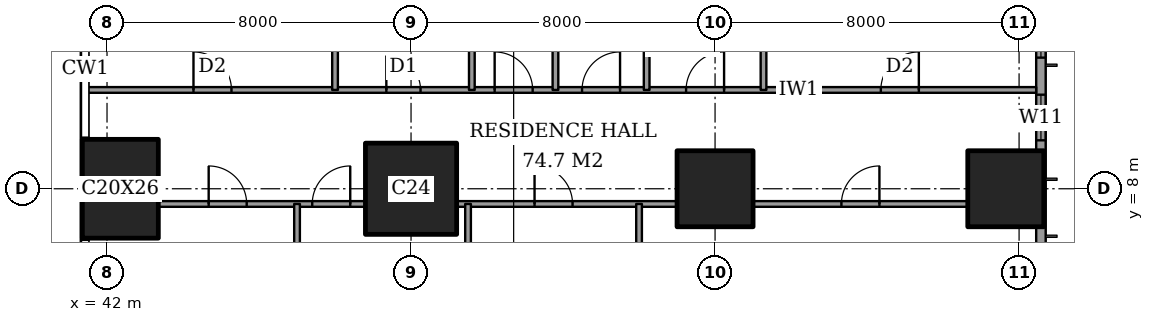
"""IFC4 building model, lengths in metres.
Left out: names, types, materials, properties, quantities, classifications, styles, units other than length and angle.
Written with IfcOpenShell. Run it as: python <this file> out.ifc"""

import sys

from ifc_helpers import new_model, si_unit, direction, frame, frame_2d, origin, origin_2d, place, context, subcontext, project, spatial, rectangle, extrude, element, fill, save


model = new_model("IFC4")
c1 = context("Model", 3, precision=1e-05, world=origin(), true_north=direction((0.0, 1.0)))
c2 = subcontext(c1, "Body", "Model", "MODEL_VIEW")
j1 = project(units=[si_unit("LENGTHUNIT", "METRE"), si_unit("PLANEANGLEUNIT", "RADIAN")], contexts=[c1])
p1 = place(None, origin())
s1 = spatial("IfcSite", under=j1, at=p1, CompositionType="ELEMENT")
p2 = place(p1, origin())
s2 = spatial("IfcBuilding", under=s1, at=p2, CompositionType="ELEMENT")
p3 = place(p2, frame((0.0, 0.0, 99.8)))
s3 = spatial("IfcBuildingStorey", under=s2, at=p3, CompositionType="ELEMENT", Elevation=99.8)
p4 = place(p3, frame((42.35, 8.0, 0.0), z_axis=(0.0, 0.0, 1.0), x_axis=(1.0, 0.0, 0.0)))
e1 = element("IfcColumn", 1, at=p4, inside=s3, PredefinedType="COLUMN", context=c2, shape_type="SweptSolid", body=[
    extrude(rectangle(XDim=2.0, YDim=2.6, at=origin_2d()), origin(), (0.0, 0.0, 1.0), 3.6),
])
p5 = place(p3, frame((50.0, 8.0, 0.0), z_axis=(0.0, 0.0, 1.0), x_axis=(1.0, 0.0, 0.0)))
e2 = element("IfcColumn", 2, at=p5, inside=s3, PredefinedType="COLUMN", context=c2, shape_type="SweptSolid", body=[
    extrude(rectangle(XDim=2.4, YDim=2.4, at=origin_2d()), origin(), (0.0, 0.0, 1.0), 3.6),
])
for number, where, z_axis, x_axis in (
    (3, (58.0, 8.0, 0.0), (0.0, 0.0, 1.0), (1.0, 0.0, 0.0)),
    (4, (65.65, 8.0, 0.0), (0.0, 0.0, 1.0), (1.0, 0.0, 0.0)),
):
    element("IfcColumn", number, at=place(p3, frame(where, z_axis=z_axis, x_axis=x_axis)), inside=s3, PredefinedType="COLUMN", context=c2, shape_type="SweptSolid", body=[
        extrude(rectangle(XDim=2.0, YDim=2.0, at=origin_2d()), origin(), (0.0, 0.0, 1.0), 3.6),
    ])
p6 = place(p3, frame((66.575, 3.175, 0.0), z_axis=(0.0, 0.0, 1.0), x_axis=(0.0, 1.0, 0.0)))
e5 = element("IfcWall", 5, at=p6, inside=s3, PredefinedType="SOLIDWALL", context=c2, shape_type="SweptSolid", body=[
    extrude(rectangle(XDim=41.65, YDim=0.25, at=frame_2d((20.825, 0.0))), origin(), (0.0, 0.0, 1.0), 3.6),
])
p7 = place(p6, frame((0.775, 0.0, 0.4)))
e6 = element("IfcOpeningElement", 6, at=p7, cuts=e5, PredefinedType="OPENING", context=c2, shape_type="SweptSolid", body=[
    extrude(rectangle(XDim=2.4, YDim=2.2, at=frame_2d((1.2, 1.1))), frame((0.0, 0.135, 0.0), z_axis=(0.0, -1.0, 0.0), x_axis=(1.0, 0.0, 0.0)), (0.0, 0.0, 1.0), 0.27),
])
p8 = place(p6, frame((6.1, 0.0, 0.4)))
e7 = element("IfcOpeningElement", 7, at=p8, cuts=e5, PredefinedType="OPENING", context=c2, shape_type="SweptSolid", body=[
    extrude(rectangle(XDim=1.2, YDim=2.2, at=frame_2d((0.6, 1.1))), frame((0.0, 0.135, 0.0), z_axis=(0.0, -1.0, 0.0), x_axis=(1.0, 0.0, 0.0)), (0.0, 0.0, 1.0), 0.27),
])
p9 = place(p6, frame((8.275, 0.0, 0.4)))
e8 = element("IfcOpeningElement", 8, at=p9, cuts=e5, PredefinedType="OPENING", context=c2, shape_type="SweptSolid", body=[
    extrude(rectangle(XDim=2.4, YDim=2.2, at=frame_2d((1.2, 1.1))), frame((0.0, 0.135, 0.0), z_axis=(0.0, -1.0, 0.0), x_axis=(1.0, 0.0, 0.0)), (0.0, 0.0, 1.0), 0.27),
])
p10 = place(p6, frame((15.775, 0.0, 0.4)))
e9 = element("IfcOpeningElement", 9, at=p10, cuts=e5, PredefinedType="OPENING", context=c2, shape_type="SweptSolid", body=[
    extrude(rectangle(XDim=2.4, YDim=2.2, at=frame_2d((1.2, 1.1))), frame((0.0, 0.135, 0.0), z_axis=(0.0, -1.0, 0.0), x_axis=(1.0, 0.0, 0.0)), (0.0, 0.0, 1.0), 0.27),
])
p11 = place(p6, frame((23.475, 0.0, 0.4)))
e10 = element("IfcOpeningElement", 10, at=p11, cuts=e5, PredefinedType="OPENING", context=c2, shape_type="SweptSolid", body=[
    extrude(rectangle(XDim=2.4, YDim=2.2, at=frame_2d((1.2, 1.1))), frame((0.0, 0.135, 0.0), z_axis=(0.0, -1.0, 0.0), x_axis=(1.0, 0.0, 0.0)), (0.0, 0.0, 1.0), 0.27),
])
p12 = place(p6, frame((30.975, 0.0, 0.4)))
e11 = element("IfcOpeningElement", 11, at=p12, cuts=e5, PredefinedType="OPENING", context=c2, shape_type="SweptSolid", body=[
    extrude(rectangle(XDim=2.4, YDim=2.2, at=frame_2d((1.2, 1.1))), frame((0.0, 0.135, 0.0), z_axis=(0.0, -1.0, 0.0), x_axis=(1.0, 0.0, 0.0)), (0.0, 0.0, 1.0), 0.27),
])
p13 = place(p6, frame((34.5, 0.0, 0.4)))
e12 = element("IfcOpeningElement", 12, at=p13, cuts=e5, PredefinedType="OPENING", context=c2, shape_type="SweptSolid", body=[
    extrude(rectangle(XDim=1.2, YDim=2.2, at=frame_2d((0.6, 1.1))), frame((0.0, 0.135, 0.0), z_axis=(0.0, -1.0, 0.0), x_axis=(1.0, 0.0, 0.0)), (0.0, 0.0, 1.0), 0.27),
])
p14 = place(p6, frame((38.475, 0.0, 0.4)))
e13 = element("IfcOpeningElement", 13, at=p14, cuts=e5, PredefinedType="OPENING", context=c2, shape_type="SweptSolid", body=[
    extrude(rectangle(XDim=2.4, YDim=2.2, at=frame_2d((1.2, 1.1))), frame((0.0, 0.135, 0.0), z_axis=(0.0, -1.0, 0.0), x_axis=(1.0, 0.0, 0.0)), (0.0, 0.0, 1.0), 0.27),
])
p15 = place(p3, frame((43.35, 7.6, 0.0), z_axis=(0.0, 0.0, 1.0), x_axis=(1.0, 0.0, 0.0)))
e14 = element("IfcWall", 14, at=p15, inside=s3, PredefinedType="PARTITIONING", context=c2, shape_type="SweptSolid", body=[
    extrude(rectangle(XDim=5.45, YDim=0.15, at=frame_2d((2.725, 0.0))), origin(), (0.0, 0.0, 1.0), 3.35),
])
p16 = place(p15, frame((4.05, 0.0, 0.0)))
e15 = element("IfcOpeningElement", 15, at=p16, cuts=e14, PredefinedType="OPENING", context=c2, shape_type="SweptSolid", body=[
    extrude(rectangle(XDim=1.0, YDim=2.1, at=frame_2d((0.5, 1.05))), frame((0.0, 0.085, 0.0), z_axis=(0.0, -1.0, 0.0), x_axis=(1.0, 0.0, 0.0)), (0.0, 0.0, 1.0), 0.17),
])
p17 = place(p15, frame((1.325, 0.0, 0.0)))
e16 = element("IfcOpeningElement", 16, at=p17, cuts=e14, PredefinedType="OPENING", context=c2, shape_type="SweptSolid", body=[
    extrude(rectangle(XDim=1.0, YDim=2.1, at=frame_2d((0.5, 1.05))), frame((0.0, 0.085, 0.0), z_axis=(0.0, -1.0, 0.0), x_axis=(1.0, 0.0, 0.0)), (0.0, 0.0, 1.0), 0.17),
])
p18 = place(p3, frame((51.2, 7.6, 0.0), z_axis=(0.0, 0.0, 1.0), x_axis=(1.0, 0.0, 0.0)))
e17 = element("IfcWall", 17, at=p18, inside=s3, PredefinedType="PARTITIONING", context=c2, shape_type="SweptSolid", body=[
    extrude(rectangle(XDim=5.8, YDim=0.15, at=frame_2d((2.9, 0.0))), origin(), (0.0, 0.0, 1.0), 3.35),
])
p19 = place(p18, frame((2.05, 0.0, 0.0)))
e18 = element("IfcOpeningElement", 18, at=p19, cuts=e17, PredefinedType="OPENING", context=c2, shape_type="SweptSolid", body=[
    extrude(rectangle(XDim=1.0, YDim=2.1, at=frame_2d((0.5, 1.05))), frame((0.0, 0.085, 0.0), z_axis=(0.0, -1.0, 0.0), x_axis=(1.0, 0.0, 0.0)), (0.0, 0.0, 1.0), 0.17),
])
p20 = place(p3, frame((59.0, 7.6, 0.0), z_axis=(0.0, 0.0, 1.0), x_axis=(1.0, 0.0, 0.0)))
e19 = element("IfcWall", 19, at=p20, inside=s3, PredefinedType="PARTITIONING", context=c2, shape_type="SweptSolid", body=[
    extrude(rectangle(XDim=5.65, YDim=0.15, at=frame_2d((2.825, 0.0))), origin(), (0.0, 0.0, 1.0), 3.35),
])
p21 = place(p20, frame((2.325, 0.0, 0.0)))
e20 = element("IfcOpeningElement", 20, at=p21, cuts=e19, PredefinedType="OPENING", context=c2, shape_type="SweptSolid", body=[
    extrude(rectangle(XDim=1.0, YDim=2.1, at=frame_2d((0.5, 1.05))), frame((0.0, 0.085, 0.0), z_axis=(0.0, -1.0, 0.0), x_axis=(1.0, 0.0, 0.0)), (0.0, 0.0, 1.0), 0.17),
])
p22 = place(p3, frame((41.439, 10.6, 0.0), z_axis=(0.0, 0.0, 1.0), x_axis=(1.0, 0.0, 0.0)))
e21 = element("IfcWall", 21, at=p22, inside=s3, PredefinedType="PARTITIONING", context=c2, shape_type="SweptSolid", body=[
    extrude(rectangle(XDim=25.011, YDim=0.15, at=frame_2d((12.505, 0.0))), origin(), (0.0, 0.0, 1.0), 3.35),
])
p23 = place(p22, frame((10.761, 0.0, 0.0)))
e22 = element("IfcOpeningElement", 22, at=p23, cuts=e21, PredefinedType="OPENING", context=c2, shape_type="SweptSolid", body=[
    extrude(rectangle(XDim=1.0, YDim=2.1, at=frame_2d((0.5, 1.05))), frame((0.0, 0.085, 0.0), z_axis=(0.0, -1.0, 0.0), x_axis=(1.0, 0.0, 0.0)), (0.0, 0.0, 1.0), 0.17),
])
p24 = place(p22, frame((20.924, 0.0, 0.0)))
e23 = element("IfcOpeningElement", 23, at=p24, cuts=e21, PredefinedType="OPENING", context=c2, shape_type="SweptSolid", body=[
    extrude(rectangle(XDim=1.0, YDim=2.1, at=frame_2d((0.5, 1.05))), frame((0.0, 0.085, 0.0), z_axis=(0.0, -1.0, 0.0), x_axis=(1.0, 0.0, 0.0)), (0.0, 0.0, 1.0), 0.17),
])
p25 = place(p22, frame((15.799, 0.0, 0.0)))
e24 = element("IfcOpeningElement", 24, at=p25, cuts=e21, PredefinedType="OPENING", context=c2, shape_type="SweptSolid", body=[
    extrude(rectangle(XDim=1.0, YDim=2.1, at=frame_2d((0.5, 1.05))), frame((0.0, 0.085, 0.0), z_axis=(0.0, -1.0, 0.0), x_axis=(1.0, 0.0, 0.0)), (0.0, 0.0, 1.0), 0.17),
])
p26 = place(p22, frame((13.061, 0.0, 0.0)))
e25 = element("IfcOpeningElement", 25, at=p26, cuts=e21, PredefinedType="OPENING", context=c2, shape_type="SweptSolid", body=[
    extrude(rectangle(XDim=1.0, YDim=2.1, at=frame_2d((0.5, 1.05))), frame((0.0, 0.085, 0.0), z_axis=(0.0, -1.0, 0.0), x_axis=(1.0, 0.0, 0.0)), (0.0, 0.0, 1.0), 0.17),
])
p27 = place(p22, frame((7.911, 0.0, 0.0)))
e26 = element("IfcOpeningElement", 26, at=p27, cuts=e21, PredefinedType="OPENING", context=c2, shape_type="SweptSolid", body=[
    extrude(rectangle(XDim=0.9, YDim=2.1, at=frame_2d((0.45, 1.05))), frame((0.0, 0.085, 0.0), z_axis=(0.0, -1.0, 0.0), x_axis=(1.0, 0.0, 0.0)), (0.0, 0.0, 1.0), 0.17),
])
p28 = place(p22, frame((2.836, 0.0, 0.0)))
e27 = element("IfcOpeningElement", 27, at=p28, cuts=e21, PredefinedType="OPENING", context=c2, shape_type="SweptSolid", body=[
    extrude(rectangle(XDim=1.0, YDim=2.1, at=frame_2d((0.5, 1.05))), frame((0.0, 0.085, 0.0), z_axis=(0.0, -1.0, 0.0), x_axis=(1.0, 0.0, 0.0)), (0.0, 0.0, 1.0), 0.17),
])
p29 = place(p3, frame((47.0, -0.45, 0.0), z_axis=(0.0, 0.0, 1.0), x_axis=(0.0, 1.0, 0.0)))
e28 = element("IfcWall", 28, at=p29, inside=s3, PredefinedType="PARTITIONING", context=c2, shape_type="SweptSolid", body=[
    extrude(rectangle(XDim=8.05, YDim=0.15, at=frame_2d((4.025, 0.0))), origin(), (0.0, 0.0, 1.0), 3.35),
])
p30 = place(p3, frame((48.0, 10.6, 0.0), z_axis=(0.0, 0.0, 1.0), x_axis=(0.0, 1.0, 0.0)))
e29 = element("IfcWall", 29, at=p30, inside=s3, PredefinedType="PARTITIONING", context=c2, shape_type="SweptSolid", body=[
    extrude(rectangle(XDim=13.4, YDim=0.15, at=frame_2d((6.7, 0.0))), origin(), (0.0, 0.0, 1.0), 3.35),
])
p31 = place(p30, frame((10.8, 0.0, 0.0)))
e30 = element("IfcOpeningElement", 30, at=p31, cuts=e29, PredefinedType="OPENING", context=c2, shape_type="SweptSolid", body=[
    extrude(rectangle(XDim=1.2, YDim=2.4, at=frame_2d((0.6, 1.2))), frame((0.0, 0.085, 0.0), z_axis=(0.0, -1.0, 0.0), x_axis=(1.0, 0.0, 0.0)), (0.0, 0.0, 1.0), 0.17),
])
p32 = place(p30, frame((6.7, 0.0, 0.0)))
e31 = element("IfcOpeningElement", 31, at=p32, cuts=e29, PredefinedType="OPENING", context=c2, shape_type="SweptSolid", body=[
    extrude(rectangle(XDim=0.9, YDim=2.1, at=frame_2d((0.45, 1.05))), frame((0.0, 0.085, 0.0), z_axis=(0.0, -1.0, 0.0), x_axis=(1.0, 0.0, 0.0)), (0.0, 0.0, 1.0), 0.17),
])
p33 = place(p3, frame((51.5, -0.45, 0.0), z_axis=(0.0, 0.0, 1.0), x_axis=(0.0, 1.0, 0.0)))
e32 = element("IfcWall", 32, at=p33, inside=s3, PredefinedType="PARTITIONING", context=c2, shape_type="SweptSolid", body=[
    extrude(rectangle(XDim=8.05, YDim=0.15, at=frame_2d((4.025, 0.0))), origin(), (0.0, 0.0, 1.0), 3.35),
])
for number, where, z_axis, x_axis in (
    (33, (51.6, 10.6, 0.0), (0.0, 0.0, 1.0), (0.0, 1.0, 0.0)),
    (34, (53.8, 10.6, 0.0), (0.0, 0.0, 1.0), (0.0, 1.0, 0.0)),
):
    element("IfcWall", number, at=place(p3, frame(where, z_axis=z_axis, x_axis=x_axis)), inside=s3, PredefinedType="PARTITIONING", context=c2, shape_type="SweptSolid", body=[
        extrude(rectangle(XDim=4.0, YDim=0.15, at=frame_2d((2.0, 0.0))), origin(), (0.0, 0.0, 1.0), 3.35),
    ])
p34 = place(p3, frame((56.0, -0.45, 0.0), z_axis=(0.0, 0.0, 1.0), x_axis=(0.0, 1.0, 0.0)))
e35 = element("IfcWall", 35, at=p34, inside=s3, PredefinedType="PARTITIONING", context=c2, shape_type="SweptSolid", body=[
    extrude(rectangle(XDim=8.05, YDim=0.15, at=frame_2d((4.025, 0.0))), origin(), (0.0, 0.0, 1.0), 3.35),
])
p35 = place(p3, frame((56.2, 10.6, 0.0), z_axis=(0.0, 0.0, 1.0), x_axis=(0.0, 1.0, 0.0)))
e36 = element("IfcWall", 36, at=p35, inside=s3, PredefinedType="PARTITIONING", context=c2, shape_type="SweptSolid", body=[
    extrude(rectangle(XDim=11.0, YDim=0.15, at=frame_2d((5.5, 0.0))), origin(), (0.0, 0.0, 1.0), 3.35),
])
p36 = place(p35, frame((7.0, 0.0, 0.0)))
e37 = element("IfcOpeningElement", 37, at=p36, cuts=e36, PredefinedType="OPENING", context=c2, shape_type="SweptSolid", body=[
    extrude(rectangle(XDim=1.0, YDim=2.1, at=frame_2d((0.5, 1.05))), frame((0.0, 0.085, 0.0), z_axis=(0.0, -1.0, 0.0), x_axis=(1.0, 0.0, 0.0)), (0.0, 0.0, 1.0), 0.17),
])
p37 = place(p3, frame((59.275, 10.6, 0.0), z_axis=(0.0, 0.0, 1.0), x_axis=(0.0, 1.0, 0.0)))
e38 = element("IfcWall", 38, at=p37, inside=s3, PredefinedType="PARTITIONING", context=c2, shape_type="SweptSolid", body=[
    extrude(rectangle(XDim=4.2, YDim=0.15, at=frame_2d((2.1, 0.0))), origin(), (0.0, 0.0, 1.0), 3.35),
])
p38 = place(p8, origin())
e39 = element("IfcWindow", 39, at=p38, inside=s3, PartitioningType="SINGLE_PANEL", PredefinedType="WINDOW", context=c2, shape_type="SweptSolid", body=[
    extrude(rectangle(XDim=1.2, YDim=2.2, at=frame_2d((0.6, 1.1))), frame((0.0, 0.03, 0.0), z_axis=(0.0, -1.0, 0.0), x_axis=(1.0, 0.0, 0.0)), (0.0, 0.0, 1.0), 0.06),
])
fill(e7, e39)
p39 = place(p9, origin())
e40 = element("IfcWindow", 40, at=p39, inside=s3, PartitioningType="SINGLE_PANEL", PredefinedType="WINDOW", context=c2, shape_type="SweptSolid", body=[
    extrude(rectangle(XDim=2.4, YDim=2.2, at=frame_2d((1.2, 1.1))), frame((0.0, 0.03, 0.0), z_axis=(0.0, -1.0, 0.0), x_axis=(1.0, 0.0, 0.0)), (0.0, 0.0, 1.0), 0.06),
])
fill(e8, e40)
p40 = place(p21, origin())
e41 = element("IfcDoor", 41, at=p40, inside=s3, OperationType="SINGLE_SWING_LEFT", PredefinedType="DOOR", context=c2, shape_type="SweptSolid", body=[
    extrude(rectangle(XDim=1.0, YDim=2.1, at=frame_2d((0.5, 1.05))), frame((0.0, 0.025, 0.0), z_axis=(0.0, -1.0, 0.0), x_axis=(1.0, 0.0, 0.0)), (0.0, 0.0, 1.0), 0.05),
])
fill(e20, e41)
p41 = place(p19, origin())
e42 = element("IfcDoor", 42, at=p41, inside=s3, OperationType="SINGLE_SWING_RIGHT", PredefinedType="DOOR", context=c2, shape_type="SweptSolid", body=[
    extrude(rectangle(XDim=1.0, YDim=2.1, at=frame_2d((0.5, 1.05))), frame((0.0, 0.025, 0.0), z_axis=(0.0, -1.0, 0.0), x_axis=(1.0, 0.0, 0.0)), (0.0, 0.0, 1.0), 0.05),
])
fill(e18, e42)
p42 = place(p16, origin())
e43 = element("IfcDoor", 43, at=p42, inside=s3, OperationType="SINGLE_SWING_LEFT", PredefinedType="DOOR", context=c2, shape_type="SweptSolid", body=[
    extrude(rectangle(XDim=1.0, YDim=2.1, at=frame_2d((0.5, 1.05))), frame((0.0, 0.025, 0.0), z_axis=(0.0, -1.0, 0.0), x_axis=(1.0, 0.0, 0.0)), (0.0, 0.0, 1.0), 0.05),
])
fill(e15, e43)
p43 = place(p17, origin())
e44 = element("IfcDoor", 44, at=p43, inside=s3, OperationType="SINGLE_SWING_RIGHT", PredefinedType="DOOR", context=c2, shape_type="SweptSolid", body=[
    extrude(rectangle(XDim=1.0, YDim=2.1, at=frame_2d((0.5, 1.05))), frame((0.0, 0.025, 0.0), z_axis=(0.0, -1.0, 0.0), x_axis=(1.0, 0.0, 0.0)), (0.0, 0.0, 1.0), 0.05),
])
fill(e16, e44)
p44 = place(p23, origin())
e45 = element("IfcDoor", 45, at=p44, inside=s3, OperationType="SINGLE_SWING_RIGHT", PredefinedType="DOOR", context=c2, shape_type="SweptSolid", body=[
    extrude(rectangle(XDim=1.0, YDim=2.1, at=frame_2d((0.5, 1.05))), frame((0.0, 0.025, 0.0), z_axis=(0.0, -1.0, 0.0), x_axis=(1.0, 0.0, 0.0)), (0.0, 0.0, 1.0), 0.05),
])
fill(e22, e45)
p45 = place(p24, origin())
e46 = element("IfcDoor", 46, at=p45, inside=s3, OperationType="SINGLE_SWING_LEFT", PredefinedType="DOOR", context=c2, shape_type="SweptSolid", body=[
    extrude(rectangle(XDim=1.0, YDim=2.1, at=frame_2d((0.5, 1.05))), frame((0.0, 0.025, 0.0), z_axis=(0.0, -1.0, 0.0), x_axis=(1.0, 0.0, 0.0)), (0.0, 0.0, 1.0), 0.05),
])
fill(e23, e46)
p46 = place(p25, origin())
e47 = element("IfcDoor", 47, at=p46, inside=s3, OperationType="SINGLE_SWING_LEFT", PredefinedType="DOOR", context=c2, shape_type="SweptSolid", body=[
    extrude(rectangle(XDim=1.0, YDim=2.1, at=frame_2d((0.5, 1.05))), frame((0.0, 0.025, 0.0), z_axis=(0.0, -1.0, 0.0), x_axis=(1.0, 0.0, 0.0)), (0.0, 0.0, 1.0), 0.05),
])
fill(e24, e47)
p47 = place(p26, origin())
e48 = element("IfcDoor", 48, at=p47, inside=s3, OperationType="SINGLE_SWING_LEFT", PredefinedType="DOOR", context=c2, shape_type="SweptSolid", body=[
    extrude(rectangle(XDim=1.0, YDim=2.1, at=frame_2d((0.5, 1.05))), frame((0.0, 0.025, 0.0), z_axis=(0.0, -1.0, 0.0), x_axis=(1.0, 0.0, 0.0)), (0.0, 0.0, 1.0), 0.05),
])
fill(e25, e48)
p48 = place(p27, origin())
e49 = element("IfcDoor", 49, at=p48, inside=s3, OperationType="SINGLE_SWING_RIGHT", PredefinedType="DOOR", context=c2, shape_type="SweptSolid", body=[
    extrude(rectangle(XDim=0.9, YDim=2.1, at=frame_2d((0.45, 1.05))), frame((0.0, 0.025, 0.0), z_axis=(0.0, -1.0, 0.0), x_axis=(1.0, 0.0, 0.0)), (0.0, 0.0, 1.0), 0.05),
])
fill(e26, e49)
p49 = place(p28, origin())
e50 = element("IfcDoor", 50, at=p49, inside=s3, OperationType="SINGLE_SWING_RIGHT", PredefinedType="DOOR", context=c2, shape_type="SweptSolid", body=[
    extrude(rectangle(XDim=1.0, YDim=2.1, at=frame_2d((0.5, 1.05))), frame((0.0, 0.025, 0.0), z_axis=(0.0, -1.0, 0.0), x_axis=(1.0, 0.0, 0.0)), (0.0, 0.0, 1.0), 0.05),
])
fill(e27, e50)
save(model, sys.argv[1])
